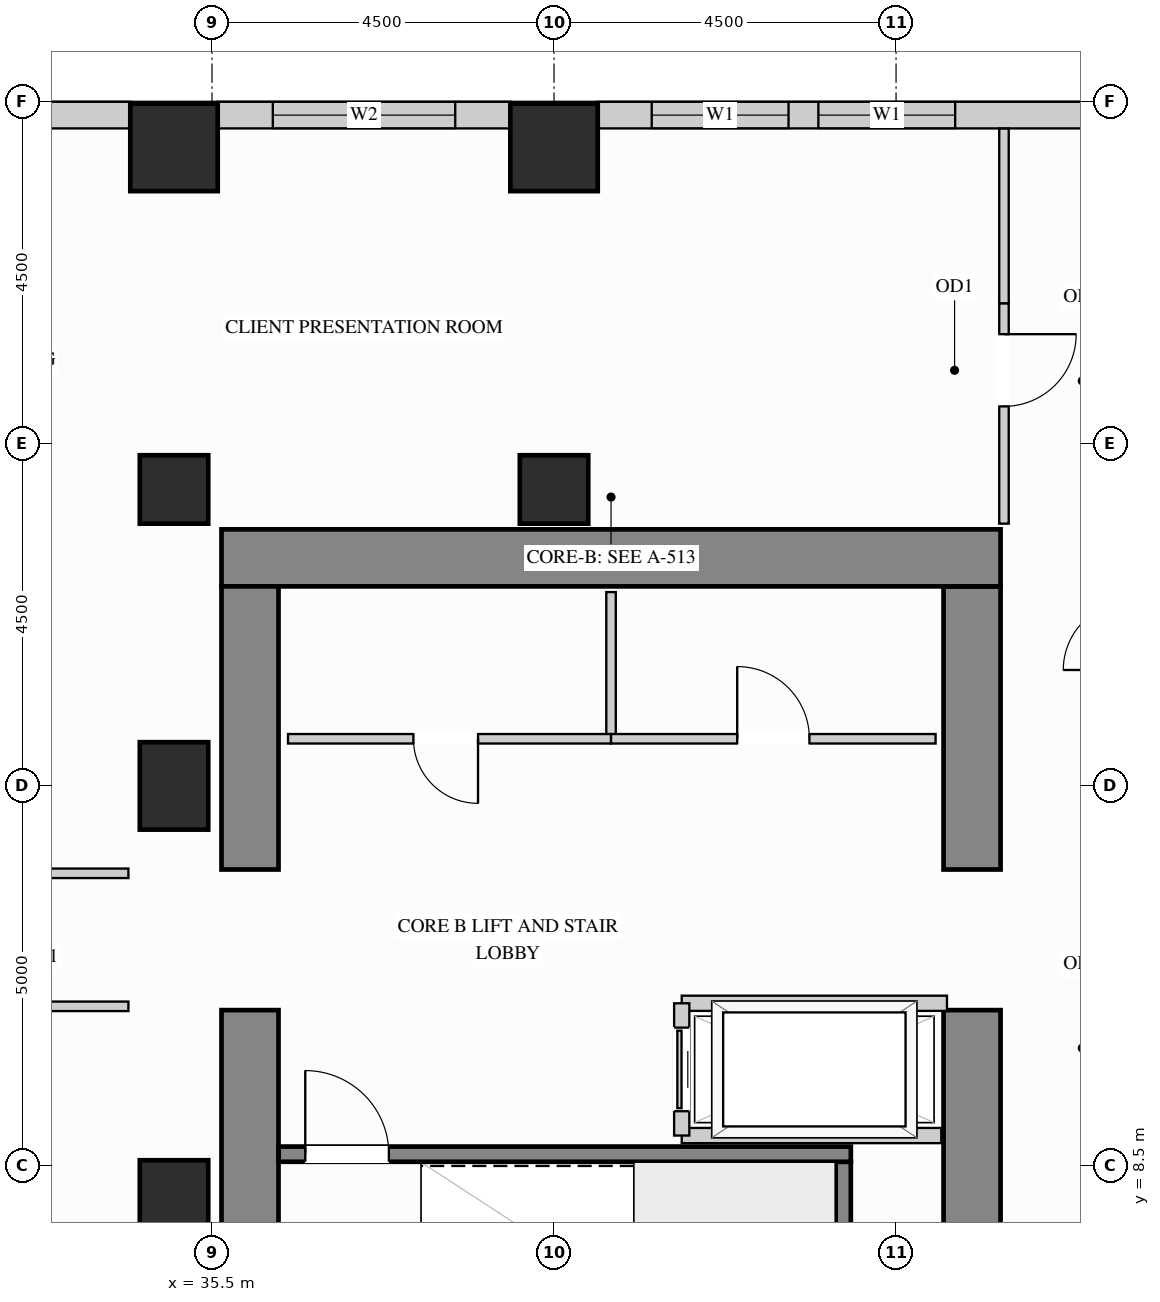
"""IFC4 building model, lengths in metres.
Left out: names, types, materials, properties, quantities, classifications, styles, units other than length and angle.
Written with IfcOpenShell. Run it as: python <this file> out.ifc"""

import sys

from ifc_helpers import new_model, si_unit, direction, frame, frame_2d, origin, origin_2d, place, context, subcontext, project, spatial, rectangle, extrude, source, transform, mapped, element, fill, save


model = new_model("IFC4")
c1 = context("Model", 3, precision=1e-05, world=origin(), true_north=direction((0.0, 1.0)))
c2 = subcontext(c1, "Body", "Model", "MODEL_VIEW")
j1 = project(units=[si_unit("LENGTHUNIT", "METRE"), si_unit("PLANEANGLEUNIT", "RADIAN")], contexts=[c1])
p1 = place(None, origin())
s1 = spatial("IfcSite", under=j1, at=p1, CompositionType="ELEMENT")
p2 = place(p1, origin())
s2 = spatial("IfcBuilding", under=s1, at=p2, CompositionType="ELEMENT")
p3 = place(p2, frame((0.0, 0.0, 84.6)))
s3 = spatial("IfcBuildingStorey", under=s2, at=p3, CompositionType="ELEMENT", Elevation=84.6)
m1 = source(origin(), c2, "Body", "SweptSolid", [
    extrude(rectangle(XDim=0.9, YDim=0.9, at=origin_2d()), origin(), (0.0, 0.0, 1.0), 3.38),
])
for number, where, z_axis, x_axis in (
    (1, (35.0, 17.4, 0.0), (0.0, 0.0, 1.0), (1.0, 0.0, 0.0)),
    (2, (40.0, 17.4, 0.0), (0.0, 0.0, 1.0), (1.0, 0.0, 0.0)),
):
    element("IfcColumn", number, at=place(p3, frame(where, z_axis=z_axis, x_axis=x_axis)), inside=s3, PredefinedType="COLUMN", context=c2, shape_type="MappedRepresentation", body=[
        mapped(m1, transform((0.0, 0.0, 0.0), x_axis=(1.0, 0.0, 0.0), y_axis=(0.0, 1.0, 0.0), z_axis=(0.0, 0.0, 1.0))),
    ])
m2 = source(origin(), c2, "Body", "SweptSolid", [
    extrude(rectangle(XDim=0.9, YDim=1.15, at=origin_2d()), origin(), (0.0, 0.0, 1.0), 3.38),
])
for number, where, z_axis, x_axis in (
    (3, (35.0, 13.5, 0.0), (0.0, 0.0, 1.0), (1.0, 0.0, 0.0)),
    (4, (35.0, 8.0, 0.0), (0.0, 0.0, 1.0), (1.0, 0.0, 0.0)),
):
    element("IfcColumn", number, at=place(p3, frame(where, z_axis=z_axis, x_axis=x_axis)), inside=s3, PredefinedType="COLUMN", context=c2, shape_type="MappedRepresentation", body=[
        mapped(m2, transform((0.0, 0.0, 0.0), x_axis=(1.0, 0.0, 0.0), y_axis=(0.0, 1.0, 0.0), z_axis=(0.0, 0.0, 1.0))),
    ])
m3 = source(origin(), c2, "Body", "SweptSolid", [
    extrude(rectangle(XDim=1.15, YDim=1.15, at=origin_2d()), origin(), (0.0, 0.0, 1.0), 3.38),
])
for number, where, z_axis, x_axis in (
    (5, (35.0, 21.9, 0.0), (0.0, 0.0, 1.0), (1.0, 0.0, 0.0)),
    (6, (40.0, 21.9, 0.0), (0.0, 0.0, 1.0), (1.0, 0.0, 0.0)),
):
    element("IfcColumn", number, at=place(p3, frame(where, z_axis=z_axis, x_axis=x_axis)), inside=s3, PredefinedType="COLUMN", context=c2, shape_type="MappedRepresentation", body=[
        mapped(m3, transform((0.0, 0.0, 0.0), x_axis=(1.0, 0.0, 0.0), y_axis=(0.0, 1.0, 0.0), z_axis=(0.0, 0.0, 1.0))),
    ])
m4 = source(origin(), c2, "Body", "SweptSolid", [
    extrude(rectangle(XDim=5.675, YDim=0.75, at=frame_2d((2.837, 0.0))), origin(), (0.0, 0.0, 1.0), 3.38),
])
p4 = place(p3, frame((45.5, 4.875, 0.0), z_axis=(0.0, 0.0, 1.0), x_axis=(0.0, 1.0, 0.0)))
e7 = element("IfcWall", 7, at=p4, inside=s3, PredefinedType="SHEAR", context=c2, shape_type="MappedRepresentation", body=[
    mapped(m4, transform((0.0, 0.0, 0.0), x_axis=(1.0, 0.0, 0.0), y_axis=(0.0, 1.0, 0.0), z_axis=(0.0, 0.0, 1.0))),
])
m5 = source(origin(), c2, "Body", "SweptSolid", [
    extrude(rectangle(XDim=3.725, YDim=0.75, at=frame_2d((1.863, 0.0))), origin(), (0.0, 0.0, 1.0), 3.38),
])
p5 = place(p3, frame((45.5, 12.4, 0.0), z_axis=(0.0, 0.0, 1.0), x_axis=(0.0, 1.0, 0.0)))
e8 = element("IfcWall", 8, at=p5, inside=s3, PredefinedType="SHEAR", context=c2, shape_type="MappedRepresentation", body=[
    mapped(m5, transform((0.0, 0.0, 0.0), x_axis=(1.0, 0.0, 0.0), y_axis=(0.0, 1.0, 0.0), z_axis=(0.0, 0.0, 1.0))),
])
m6 = source(origin(), c2, "Body", "SweptSolid", [
    extrude(rectangle(XDim=10.25, YDim=0.75, at=frame_2d((5.125, 0.0))), origin(), (0.0, 0.0, 1.0), 3.38),
])
p6 = place(p3, frame((35.625, 16.5, 0.0), z_axis=(0.0, 0.0, 1.0), x_axis=(1.0, 0.0, 0.0)))
e9 = element("IfcWall", 9, at=p6, inside=s3, PredefinedType="SHEAR", context=c2, shape_type="MappedRepresentation", body=[
    mapped(m6, transform((0.0, 0.0, 0.0), x_axis=(1.0, 0.0, 0.0), y_axis=(0.0, 1.0, 0.0), z_axis=(0.0, 0.0, 1.0))),
])
p7 = place(p3, frame((36.0, 4.875, 0.0), z_axis=(0.0, 0.0, 1.0), x_axis=(0.0, 1.0, 0.0)))
e10 = element("IfcWall", 10, at=p7, inside=s3, PredefinedType="SHEAR", context=c2, shape_type="MappedRepresentation", body=[
    mapped(m4, transform((0.0, 0.0, 0.0), x_axis=(1.0, 0.0, 0.0), y_axis=(0.0, 1.0, 0.0), z_axis=(0.0, 0.0, 1.0))),
])
p8 = place(p3, frame((36.0, 12.4, 0.0), z_axis=(0.0, 0.0, 1.0), x_axis=(0.0, 1.0, 0.0)))
e11 = element("IfcWall", 11, at=p8, inside=s3, PredefinedType="SHEAR", context=c2, shape_type="MappedRepresentation", body=[
    mapped(m5, transform((0.0, 0.0, 0.0), x_axis=(1.0, 0.0, 0.0), y_axis=(0.0, 1.0, 0.0), z_axis=(0.0, 0.0, 1.0))),
])
p9 = place(p3, frame((47.027, 22.325, 0.0), z_axis=(0.0, 0.0, 1.0), x_axis=(-1.0, 0.0, 0.0)))
e12 = element("IfcWall", 12, at=p9, inside=s3, PredefinedType="SOLIDWALL", context=c2, shape_type="SweptSolid", body=[
    extrude(rectangle(XDim=6.454, YDim=0.35, at=frame_2d((3.227, 0.0))), origin(), (0.0, 0.0, 1.0), 3.365),
])
p10 = place(p9, frame((1.749, 0.0, 0.78)))
e13 = element("IfcOpeningElement", 13, at=p10, cuts=e12, PredefinedType="OPENING", context=c2, shape_type="SweptSolid", body=[
    extrude(rectangle(XDim=1.8, YDim=2.1, at=frame_2d((0.9, 1.05))), frame((0.0, 0.185, 0.0), z_axis=(0.0, -1.0, 0.0), x_axis=(1.0, 0.0, 0.0)), (0.0, 0.0, 1.0), 0.37),
])
p11 = place(p9, frame((3.942, 0.0, 0.78)))
e14 = element("IfcOpeningElement", 14, at=p11, cuts=e12, PredefinedType="OPENING", context=c2, shape_type="SweptSolid", body=[
    extrude(rectangle(XDim=1.8, YDim=2.1, at=frame_2d((0.9, 1.05))), frame((0.0, 0.185, 0.0), z_axis=(0.0, -1.0, 0.0), x_axis=(1.0, 0.0, 0.0)), (0.0, 0.0, 1.0), 0.37),
])
p12 = place(p3, frame((39.427, 22.325, 0.0), z_axis=(0.0, 0.0, 1.0), x_axis=(-1.0, 0.0, 0.0)))
e15 = element("IfcWall", 15, at=p12, inside=s3, PredefinedType="SOLIDWALL", context=c2, shape_type="SweptSolid", body=[
    extrude(rectangle(XDim=3.854, YDim=0.35, at=frame_2d((1.927, 0.0))), origin(), (0.0, 0.0, 1.0), 3.365),
])
p13 = place(p12, frame((0.727, 0.0, 0.78)))
e16 = element("IfcOpeningElement", 16, at=p13, cuts=e15, PredefinedType="OPENING", context=c2, shape_type="SweptSolid", body=[
    extrude(rectangle(XDim=2.4, YDim=2.1, at=frame_2d((1.2, 1.05))), frame((0.0, 0.185, 0.0), z_axis=(0.0, -1.0, 0.0), x_axis=(1.0, 0.0, 0.0)), (0.0, 0.0, 1.0), 0.37),
])
p14 = place(p3, frame((34.427, 22.325, 0.0), z_axis=(0.0, 0.0, 1.0), x_axis=(-1.0, 0.0, 0.0)))
e17 = element("IfcWall", 17, at=p14, inside=s3, PredefinedType="SOLIDWALL", context=c2, shape_type="SweptSolid", body=[
    extrude(rectangle(XDim=14.979, YDim=0.35, at=frame_2d((7.49, 0.0))), origin(), (0.0, 0.0, 1.0), 3.365),
])
p15 = place(p14, frame((4.1, 0.0, 0.78)))
e18 = element("IfcOpeningElement", 18, at=p15, cuts=e17, PredefinedType="OPENING", context=c2, shape_type="SweptSolid", body=[
    extrude(rectangle(XDim=1.5, YDim=2.0, at=frame_2d((0.75, 1.0))), frame((0.0, 0.185, 0.0), z_axis=(0.0, -1.0, 0.0), x_axis=(1.0, 0.0, 0.0)), (0.0, 0.0, 1.0), 0.37),
])
p16 = place(p14, frame((9.379, 0.0, 0.78)))
e19 = element("IfcOpeningElement", 19, at=p16, cuts=e17, PredefinedType="OPENING", context=c2, shape_type="SweptSolid", body=[
    extrude(rectangle(XDim=1.5, YDim=2.0, at=frame_2d((0.75, 1.0))), frame((0.0, 0.185, 0.0), z_axis=(0.0, -1.0, 0.0), x_axis=(1.0, 0.0, 0.0)), (0.0, 0.0, 1.0), 0.37),
])
m7 = source(origin(), c2, "Body", "SweptSolid", [
    extrude(rectangle(XDim=1.93, YDim=0.125, at=frame_2d((0.965, 0.0))), origin(), (0.0, 0.0, 1.0), 3.365),
])
p17 = place(p3, frame((40.75, 14.12, 0.0), z_axis=(0.0, 0.0, 1.0), x_axis=(0.0, 1.0, 0.0)))
e20 = element("IfcWall", 20, at=p17, inside=s3, PredefinedType="PARTITIONING", context=c2, shape_type="MappedRepresentation", body=[
    mapped(m7, transform((0.0, 0.0, 0.0), x_axis=(1.0, 0.0, 0.0), y_axis=(0.0, 1.0, 0.0), z_axis=(0.0, 0.0, 1.0))),
])
p18 = place(p3, frame((36.5, 14.12, 0.0), z_axis=(0.0, 0.0, 1.0), x_axis=(1.0, 0.0, 0.0)))
e21 = element("IfcWall", 21, at=p18, inside=s3, PredefinedType="PARTITIONING", context=c2, shape_type="SweptSolid", body=[
    extrude(rectangle(XDim=4.25, YDim=0.125, at=frame_2d((2.125, 0.0))), origin(), (0.0, 0.0, 1.0), 3.365),
])
p19 = place(p18, frame((1.65, 0.0, 0.0)))
e22 = element("IfcOpeningElement", 22, at=p19, cuts=e21, PredefinedType="OPENING", context=c2, shape_type="SweptSolid", body=[
    extrude(rectangle(XDim=0.85, YDim=2.1, at=frame_2d((0.425, 1.05))), frame((0.0, 0.073, 0.0), z_axis=(0.0, -1.0, 0.0), x_axis=(1.0, 0.0, 0.0)), (0.0, 0.0, 1.0), 0.145),
])
p20 = place(p3, frame((40.75, 14.12, 0.0), z_axis=(0.0, 0.0, 1.0), x_axis=(1.0, 0.0, 0.0)))
e23 = element("IfcWall", 23, at=p20, inside=s3, PredefinedType="PARTITIONING", context=c2, shape_type="SweptSolid", body=[
    extrude(rectangle(XDim=4.27, YDim=0.125, at=frame_2d((2.135, 0.0))), origin(), (0.0, 0.0, 1.0), 3.365),
])
p21 = place(p20, frame((1.66, 0.0, 0.0)))
e24 = element("IfcOpeningElement", 24, at=p21, cuts=e23, PredefinedType="OPENING", context=c2, shape_type="SweptSolid", body=[
    extrude(rectangle(XDim=0.95, YDim=2.15, at=frame_2d((0.475, 1.075))), frame((0.0, 0.073, 0.0), z_axis=(0.0, -1.0, 0.0), x_axis=(1.0, 0.0, 0.0)), (0.0, 0.0, 1.0), 0.145),
])
p22 = place(p3, frame((45.92, 16.95, 0.0), z_axis=(0.0, 0.0, 1.0), x_axis=(0.0, 1.0, 0.0)))
e25 = element("IfcWall", 25, at=p22, inside=s3, PredefinedType="PARTITIONING", context=c2, shape_type="SweptSolid", body=[
    extrude(rectangle(XDim=2.9, YDim=0.125, at=frame_2d((1.45, 0.0))), origin(), (0.0, 0.0, 1.0), 3.365),
])
p23 = place(p22, frame((1.543, 0.0, 0.0)))
e26 = element("IfcOpeningElement", 26, at=p23, cuts=e25, PredefinedType="OPENING", context=c2, shape_type="SweptSolid", body=[
    extrude(rectangle(XDim=0.95, YDim=2.15, at=frame_2d((0.475, 1.075))), frame((0.0, 0.073, 0.0), z_axis=(0.0, -1.0, 0.0), x_axis=(1.0, 0.0, 0.0)), (0.0, 0.0, 1.0), 0.145),
])
m8 = source(origin(), c2, "Body", "SweptSolid", [
    extrude(rectangle(XDim=2.298, YDim=0.125, at=frame_2d((1.149, 0.0))), origin(), (0.0, 0.0, 1.0), 3.365),
])
p24 = place(p3, frame((45.92, 19.85, 0.0), z_axis=(0.0, 0.0, 1.0), x_axis=(0.0, 1.0, 0.0)))
e27 = element("IfcWall", 27, at=p24, inside=s3, PredefinedType="PARTITIONING", context=c2, shape_type="MappedRepresentation", body=[
    mapped(m8, transform((0.0, 0.0, 0.0), x_axis=(1.0, 0.0, 0.0), y_axis=(0.0, 1.0, 0.0), z_axis=(0.0, 0.0, 1.0))),
])
p25 = place(p3, frame((29.85, 12.35, 0.0), z_axis=(0.0, 0.0, 1.0), x_axis=(1.0, 0.0, 0.0)))
e28 = element("IfcWall", 28, at=p25, inside=s3, PredefinedType="PARTITIONING", context=c2, shape_type="SweptSolid", body=[
    extrude(rectangle(XDim=4.55, YDim=0.125, at=frame_2d((2.275, 0.0))), origin(), (0.0, 0.0, 1.0), 3.365),
])
p26 = place(p25, frame((1.8, 0.0, 0.0)))
e29 = element("IfcOpeningElement", 29, at=p26, cuts=e28, PredefinedType="OPENING", context=c2, shape_type="SweptSolid", body=[
    extrude(rectangle(XDim=0.95, YDim=2.15, at=frame_2d((0.475, 1.075))), frame((0.0, 0.073, 0.0), z_axis=(0.0, -1.0, 0.0), x_axis=(1.0, 0.0, 0.0)), (0.0, 0.0, 1.0), 0.145),
])
p27 = place(p3, frame((29.85, 10.6, 0.0), z_axis=(0.0, 0.0, 1.0), x_axis=(1.0, 0.0, 0.0)))
e30 = element("IfcWall", 30, at=p27, inside=s3, PredefinedType="PARTITIONING", context=c2, shape_type="SweptSolid", body=[
    extrude(rectangle(XDim=4.55, YDim=0.125, at=frame_2d((2.275, 0.0))), origin(), (0.0, 0.0, 1.0), 3.365),
])
p28 = place(p27, frame((1.8, 0.0, 0.0)))
e31 = element("IfcOpeningElement", 31, at=p28, cuts=e30, PredefinedType="OPENING", context=c2, shape_type="SweptSolid", body=[
    extrude(rectangle(XDim=0.95, YDim=2.15, at=frame_2d((0.475, 1.075))), frame((0.0, 0.073, 0.0), z_axis=(0.0, -1.0, 0.0), x_axis=(1.0, 0.0, 0.0)), (0.0, 0.0, 1.0), 0.145),
])
m9 = source(origin(), c2, "Body", "SweptSolid", [
    extrude(rectangle(XDim=3.49, YDim=0.2, at=frame_2d((1.745, 0.0))), origin(), (0.0, 0.0, 1.0), 3.365),
])
p29 = place(p3, frame((41.68, 10.64, 0.0), z_axis=(0.0, 0.0, 1.0), x_axis=(1.0, 0.0, 0.0)))
e32 = element("IfcWall", 32, at=p29, inside=s3, PredefinedType="PARTITIONING", context=c2, shape_type="MappedRepresentation", body=[
    mapped(m9, transform((0.0, 0.0, 0.0), x_axis=(1.0, 0.0, 0.0), y_axis=(0.0, 1.0, 0.0), z_axis=(0.0, 0.0, 1.0))),
])
m10 = source(origin(), c2, "Body", "SweptSolid", [
    extrude(rectangle(XDim=3.415, YDim=0.2, at=frame_2d((1.708, 0.0))), origin(), (0.0, 0.0, 1.0), 3.365),
])
p30 = place(p3, frame((41.68, 8.9, 0.0), z_axis=(0.0, 0.0, 1.0), x_axis=(1.0, 0.0, 0.0)))
e33 = element("IfcWall", 33, at=p30, inside=s3, PredefinedType="PARTITIONING", context=c2, shape_type="MappedRepresentation", body=[
    mapped(m10, transform((0.0, 0.0, 0.0), x_axis=(1.0, 0.0, 0.0), y_axis=(0.0, 1.0, 0.0), z_axis=(0.0, 0.0, 1.0))),
])
p31 = place(p3, frame((41.68, 8.9, 0.0), z_axis=(0.0, 0.0, 1.0), x_axis=(0.0, 1.0, 0.0)))
e34 = element("IfcWall", 34, at=p31, inside=s3, PredefinedType="PARTITIONING", context=c2, shape_type="SweptSolid", body=[
    extrude(rectangle(XDim=1.74, YDim=0.2, at=frame_2d((0.87, 0.0))), origin(), (0.0, 0.0, 1.0), 3.365),
])
p32 = place(p31, frame((0.32, 0.0, 0.0)))
e35 = element("IfcOpeningElement", 35, at=p32, cuts=e34, PredefinedType="OPENING", context=c2, shape_type="SweptSolid", body=[
    extrude(rectangle(XDim=1.1, YDim=2.2, at=frame_2d((0.55, 1.1))), frame((0.0, 0.11, 0.0), z_axis=(0.0, -1.0, 0.0), x_axis=(1.0, 0.0, 0.0)), (0.0, 0.0, 1.0), 0.22),
])
m11 = source(origin(), c2, "Body", "SweptSolid", [
    extrude(rectangle(XDim=3.678, YDim=0.2, at=frame_2d((1.839, 0.0))), origin(), (0.0, 0.0, 1.0), 3.38),
])
p33 = place(p3, frame((43.805, 4.877, 0.0), z_axis=(0.0, 0.0, 1.0), x_axis=(0.0, 1.0, 0.0)))
e36 = element("IfcWall", 36, at=p33, inside=s3, PredefinedType="SHEAR", context=c2, shape_type="MappedRepresentation", body=[
    mapped(m11, transform((0.0, 0.0, 0.0), x_axis=(1.0, 0.0, 0.0), y_axis=(0.0, 1.0, 0.0), z_axis=(0.0, 0.0, 1.0))),
])
p34 = place(p3, frame((36.377, 8.655, 0.0), z_axis=(0.0, 0.0, 1.0), x_axis=(1.0, 0.0, 0.0)))
e37 = element("IfcWall", 37, at=p34, inside=s3, PredefinedType="SHEAR", context=c2, shape_type="SweptSolid", body=[
    extrude(rectangle(XDim=7.528, YDim=0.2, at=frame_2d((3.764, 0.0))), origin(), (0.0, 0.0, 1.0), 3.38),
])
p35 = place(p34, frame((0.35, 0.0, 0.0)))
e38 = element("IfcOpeningElement", 38, at=p35, cuts=e37, PredefinedType="OPENING", context=c2, shape_type="SweptSolid", body=[
    extrude(rectangle(XDim=1.1, YDim=2.15, at=frame_2d((0.55, 1.075))), frame((0.0, 0.11, 0.0), z_axis=(0.0, -1.0, 0.0), x_axis=(1.0, 0.0, 0.0)), (0.0, 0.0, 1.0), 0.22),
])
m12 = source(origin(), c2, "Body", "SweptSolid", [
    extrude(rectangle(XDim=1.1, YDim=2.2, at=frame_2d((0.55, 1.1))), frame((0.0, 0.025, 0.0), z_axis=(0.0, -1.0, 0.0), x_axis=(1.0, 0.0, 0.0)), (0.0, 0.0, 1.0), 0.05),
])
p36 = place(p32, origin())
e39 = element("IfcDoor", 39, at=p36, inside=s3, OperationType="SLIDING_TO_LEFT", PredefinedType="DOOR", context=c2, shape_type="MappedRepresentation", body=[
    mapped(m12, transform((0.0, 0.0, 0.0), x_axis=(1.0, 0.0, 0.0), y_axis=(0.0, 1.0, 0.0), z_axis=(0.0, 0.0, 1.0))),
])
fill(e35, e39)
m13 = source(origin(), c2, "Body", "SweptSolid", [
    extrude(rectangle(XDim=0.95, YDim=2.15, at=frame_2d((0.475, 1.075))), frame((0.0, 0.025, 0.0), z_axis=(0.0, -1.0, 0.0), x_axis=(1.0, 0.0, 0.0)), (0.0, 0.0, 1.0), 0.05),
])
p37 = place(p21, origin())
e40 = element("IfcDoor", 40, at=p37, inside=s3, OperationType="SINGLE_SWING_LEFT", PredefinedType="DOOR", context=c2, shape_type="MappedRepresentation", body=[
    mapped(m13, transform((0.0, 0.0, 0.0), x_axis=(1.0, 0.0, 0.0), y_axis=(0.0, 1.0, 0.0), z_axis=(0.0, 0.0, 1.0))),
])
fill(e24, e40)
p38 = place(p23, origin())
e41 = element("IfcDoor", 41, at=p38, inside=s3, OperationType="SINGLE_SWING_RIGHT", PredefinedType="DOOR", context=c2, shape_type="MappedRepresentation", body=[
    mapped(m13, transform((0.0, 0.0, 0.0), x_axis=(1.0, 0.0, 0.0), y_axis=(0.0, 1.0, 0.0), z_axis=(0.0, 0.0, 1.0))),
])
fill(e26, e41)
m14 = source(origin(), c2, "Body", "SweptSolid", [
    extrude(rectangle(XDim=0.85, YDim=2.1, at=frame_2d((0.425, 1.05))), frame((0.0, 0.025, 0.0), z_axis=(0.0, -1.0, 0.0), x_axis=(1.0, 0.0, 0.0)), (0.0, 0.0, 1.0), 0.05),
])
p39 = place(p19, origin())
e42 = element("IfcDoor", 42, at=p39, inside=s3, OperationType="SINGLE_SWING_RIGHT", PredefinedType="DOOR", context=c2, shape_type="MappedRepresentation", body=[
    mapped(m14, transform((0.0, 0.0, 0.0), x_axis=(1.0, 0.0, 0.0), y_axis=(0.0, 1.0, 0.0), z_axis=(0.0, 0.0, 1.0))),
])
fill(e22, e42)
m15 = source(origin(), c2, "Body", "SweptSolid", [
    extrude(rectangle(XDim=1.1, YDim=2.15, at=frame_2d((0.55, 1.075))), frame((0.0, 0.025, 0.0), z_axis=(0.0, -1.0, 0.0), x_axis=(1.0, 0.0, 0.0)), (0.0, 0.0, 1.0), 0.05),
])
p40 = place(p35, origin())
e43 = element("IfcDoor", 43, at=p40, inside=s3, OperationType="SINGLE_SWING_LEFT", PredefinedType="DOOR", context=c2, shape_type="MappedRepresentation", body=[
    mapped(m15, transform((0.0, 0.0, 0.0), x_axis=(1.0, 0.0, 0.0), y_axis=(0.0, 1.0, 0.0), z_axis=(0.0, 0.0, 1.0))),
])
fill(e38, e43)
m16 = source(origin(), c2, "Body", "SweptSolid", [
    extrude(rectangle(XDim=1.8, YDim=2.1, at=frame_2d((0.9, 1.05))), frame((0.0, 0.03, 0.0), z_axis=(0.0, -1.0, 0.0), x_axis=(1.0, 0.0, 0.0)), (0.0, 0.0, 1.0), 0.06),
])
p41 = place(p10, origin())
e44 = element("IfcWindow", 44, at=p41, inside=s3, PartitioningType="SINGLE_PANEL", PredefinedType="WINDOW", context=c2, shape_type="MappedRepresentation", body=[
    mapped(m16, transform((0.0, 0.0, 0.0), x_axis=(1.0, 0.0, 0.0), y_axis=(0.0, 1.0, 0.0), z_axis=(0.0, 0.0, 1.0))),
])
fill(e13, e44)
p42 = place(p11, origin())
e45 = element("IfcWindow", 45, at=p42, inside=s3, PartitioningType="SINGLE_PANEL", PredefinedType="WINDOW", context=c2, shape_type="MappedRepresentation", body=[
    mapped(m16, transform((0.0, 0.0, 0.0), x_axis=(1.0, 0.0, 0.0), y_axis=(0.0, 1.0, 0.0), z_axis=(0.0, 0.0, 1.0))),
])
fill(e14, e45)
m17 = source(origin(), c2, "Body", "SweptSolid", [
    extrude(rectangle(XDim=2.4, YDim=2.1, at=frame_2d((1.2, 1.05))), frame((0.0, 0.03, 0.0), z_axis=(0.0, -1.0, 0.0), x_axis=(1.0, 0.0, 0.0)), (0.0, 0.0, 1.0), 0.06),
])
p43 = place(p13, origin())
e46 = element("IfcWindow", 46, at=p43, inside=s3, PartitioningType="SINGLE_PANEL", PredefinedType="WINDOW", context=c2, shape_type="MappedRepresentation", body=[
    mapped(m17, transform((0.0, 0.0, 0.0), x_axis=(1.0, 0.0, 0.0), y_axis=(0.0, 1.0, 0.0), z_axis=(0.0, 0.0, 1.0))),
])
fill(e16, e46)
save(model, sys.argv[1])
